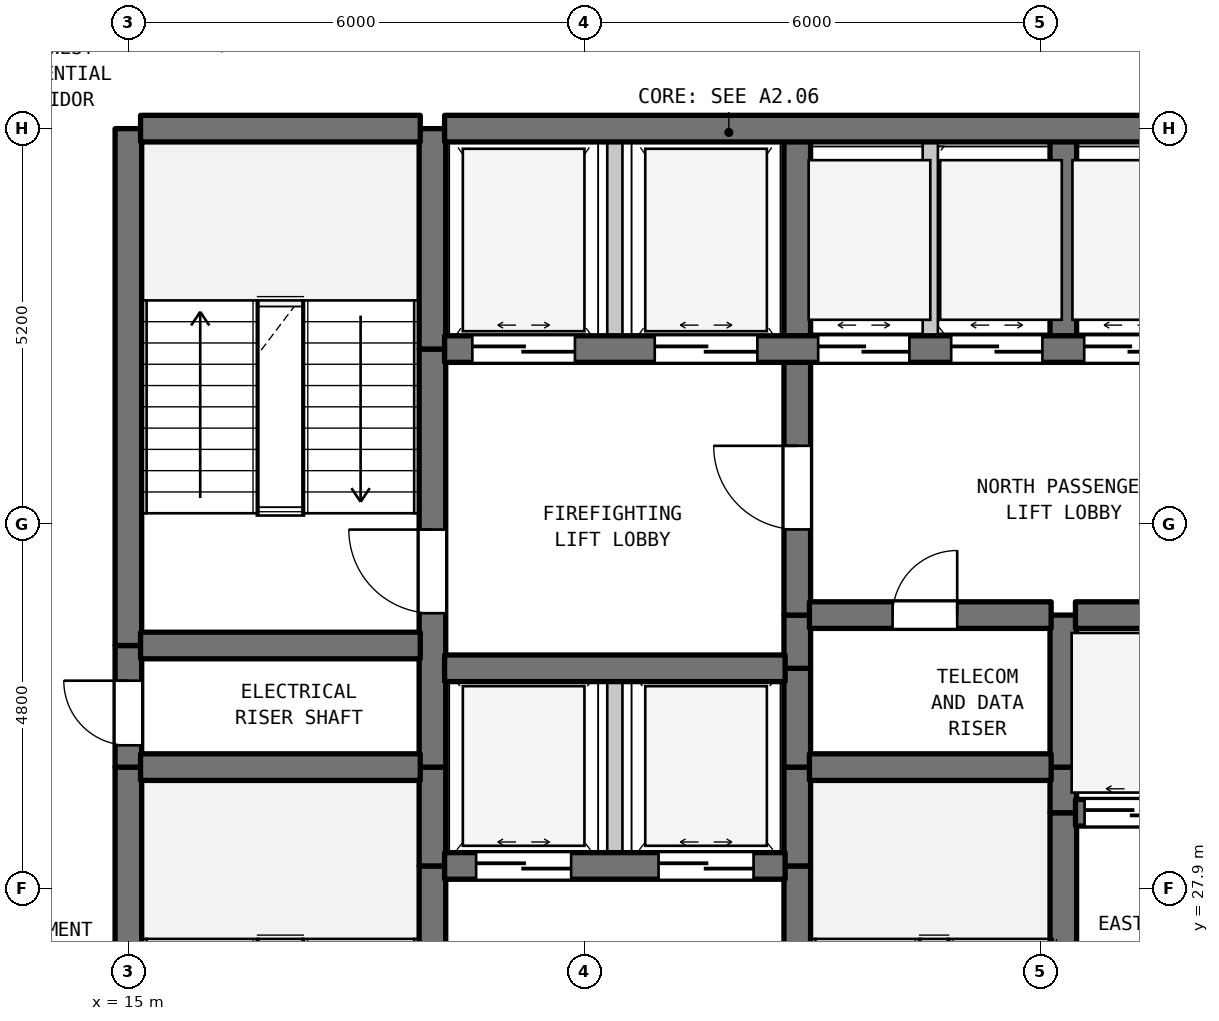
"""IFC4 building model, lengths in metres.
Left out: names, types, materials, properties, quantities, classifications, styles, units other than length and angle.
Written with IfcOpenShell. Run it as: python <this file> out.ifc"""

import sys

from ifc_helpers import new_model, si_unit, direction, frame, frame_2d, origin, place, context, subcontext, project, spatial, rectangle, extrude, element, fill, save


model = new_model("IFC4")
c1 = context("Model", 3, precision=1e-05, world=origin(), true_north=direction((0.0, 1.0)))
c2 = subcontext(c1, "Body", "Model", "MODEL_VIEW")
j1 = project(units=[si_unit("LENGTHUNIT", "METRE"), si_unit("PLANEANGLEUNIT", "RADIAN")], contexts=[c1])
p1 = place(None, origin())
s1 = spatial("IfcSite", under=j1, at=p1, CompositionType="ELEMENT")
p2 = place(p1, origin())
s2 = spatial("IfcBuilding", under=s1, at=p2, CompositionType="ELEMENT")
p3 = place(p2, frame((0.0, 0.0, 24.0)))
s3 = spatial("IfcBuildingStorey", under=s2, at=p3, CompositionType="ELEMENT", Elevation=24.0)
p4 = place(p3, frame((15.0, 22.7, 0.0), z_axis=(0.0, 0.0, 1.0), x_axis=(0.0, 1.0, 0.0)))
e1 = element("IfcWall", 1, at=p4, inside=s3, PredefinedType="SHEAR", context=c2, shape_type="SweptSolid", body=[
    extrude(rectangle(XDim=6.8, YDim=0.35, at=frame_2d((3.4, 0.0))), origin(), (0.0, 0.0, 1.0), 3.385),
])
p5 = place(p3, frame((15.0, 29.5, 0.0), z_axis=(0.0, 0.0, 1.0), x_axis=(0.0, 1.0, 0.0)))
e2 = element("IfcWall", 2, at=p5, inside=s3, PredefinedType="SHEAR", context=c2, shape_type="SweptSolid", body=[
    extrude(rectangle(XDim=1.6, YDim=0.35, at=frame_2d((0.8, 0.0))), origin(), (0.0, 0.0, 1.0), 3.385),
])
p6 = place(p5, frame((0.287, 0.0, 0.0)))
e3 = element("IfcOpeningElement", 3, at=p6, cuts=e2, PredefinedType="OPENING", context=c2, shape_type="SweptSolid", body=[
    extrude(rectangle(XDim=0.85, YDim=2.1, at=frame_2d((0.425, 1.05))), frame((0.0, 0.185, 0.0), z_axis=(0.0, -1.0, 0.0), x_axis=(1.0, 0.0, 0.0)), (0.0, 0.0, 1.0), 0.37),
])
p7 = place(p3, frame((15.0, 31.1, 0.0), z_axis=(0.0, 0.0, 1.0), x_axis=(0.0, 1.0, 0.0)))
e4 = element("IfcWall", 4, at=p7, inside=s3, PredefinedType="SHEAR", context=c2, shape_type="SweptSolid", body=[
    extrude(rectangle(XDim=6.8, YDim=0.35, at=frame_2d((3.4, 0.0))), origin(), (0.0, 0.0, 1.0), 3.385),
])
p8 = place(p3, frame((19.0, 22.7, 0.0), z_axis=(0.0, 0.0, 1.0), x_axis=(0.0, 1.0, 0.0)))
e5 = element("IfcWall", 5, at=p8, inside=s3, PredefinedType="SHEAR", context=c2, shape_type="SweptSolid", body=[
    extrude(rectangle(XDim=5.5, YDim=0.35, at=frame_2d((2.75, 0.0))), origin(), (0.0, 0.0, 1.0), 3.385),
])
p9 = place(p8, frame((0.631, 0.0, 0.0)))
e6 = element("IfcOpeningElement", 6, at=p9, cuts=e5, PredefinedType="OPENING", context=c2, shape_type="SweptSolid", body=[
    extrude(rectangle(XDim=1.1, YDim=2.15, at=frame_2d((0.55, 1.075))), frame((0.0, 0.185, 0.0), z_axis=(0.0, -1.0, 0.0), x_axis=(1.0, 0.0, 0.0)), (0.0, 0.0, 1.0), 0.37),
])
p10 = place(p3, frame((19.0, 28.2, 0.0), z_axis=(0.0, 0.0, 1.0), x_axis=(0.0, 1.0, 0.0)))
e7 = element("IfcWall", 7, at=p10, inside=s3, PredefinedType="SHEAR", context=c2, shape_type="SweptSolid", body=[
    extrude(rectangle(XDim=1.3, YDim=0.35, at=frame_2d((0.65, 0.0))), origin(), (0.0, 0.0, 1.0), 3.385),
])
p11 = place(p3, frame((19.0, 29.5, 0.0), z_axis=(0.0, 0.0, 1.0), x_axis=(0.0, 1.0, 0.0)))
e8 = element("IfcWall", 8, at=p11, inside=s3, PredefinedType="SHEAR", context=c2, shape_type="SweptSolid", body=[
    extrude(rectangle(XDim=5.5, YDim=0.35, at=frame_2d((2.75, 0.0))), origin(), (0.0, 0.0, 1.0), 3.385),
])
p12 = place(p11, frame((2.025, 0.0, 0.0)))
e9 = element("IfcOpeningElement", 9, at=p12, cuts=e8, PredefinedType="OPENING", context=c2, shape_type="SweptSolid", body=[
    extrude(rectangle(XDim=1.1, YDim=2.15, at=frame_2d((0.55, 1.075))), frame((0.0, 0.185, 0.0), z_axis=(0.0, -1.0, 0.0), x_axis=(1.0, 0.0, 0.0)), (0.0, 0.0, 1.0), 0.37),
])
p13 = place(p3, frame((19.0, 35.0, 0.0), z_axis=(0.0, 0.0, 1.0), x_axis=(0.0, 1.0, 0.0)))
e10 = element("IfcWall", 10, at=p13, inside=s3, PredefinedType="SHEAR", context=c2, shape_type="SweptSolid", body=[
    extrude(rectangle(XDim=2.9, YDim=0.35, at=frame_2d((1.45, 0.0))), origin(), (0.0, 0.0, 1.0), 3.385),
])
p14 = place(p3, frame((21.4, 28.2, 0.0), z_axis=(0.0, 0.0, 1.0), x_axis=(0.0, 1.0, 0.0)))
e11 = element("IfcWall", 11, at=p14, inside=s3, PredefinedType="STANDARD", context=c2, shape_type="SweptSolid", body=[
    extrude(rectangle(XDim=2.6, YDim=0.2, at=frame_2d((1.3, 0.0))), origin(), (0.0, 0.0, 1.0), 3.385),
])
p15 = place(p3, frame((21.4, 35.0, 0.0), z_axis=(0.0, 0.0, 1.0), x_axis=(0.0, 1.0, 0.0)))
e12 = element("IfcWall", 12, at=p15, inside=s3, PredefinedType="STANDARD", context=c2, shape_type="SweptSolid", body=[
    extrude(rectangle(XDim=2.9, YDim=0.2, at=frame_2d((1.45, 0.0))), origin(), (0.0, 0.0, 1.0), 3.385),
])
p16 = place(p3, frame((23.8, 22.7, 0.0), z_axis=(0.0, 0.0, 1.0), x_axis=(0.0, 1.0, 0.0)))
e13 = element("IfcWall", 13, at=p16, inside=s3, PredefinedType="SHEAR", context=c2, shape_type="SweptSolid", body=[
    extrude(rectangle(XDim=5.5, YDim=0.35, at=frame_2d((2.75, 0.0))), origin(), (0.0, 0.0, 1.0), 3.385),
])
p17 = place(p16, frame((0.235, 0.0, 0.0)))
e14 = element("IfcOpeningElement", 14, at=p17, cuts=e13, PredefinedType="OPENING", context=c2, shape_type="SweptSolid", body=[
    extrude(rectangle(XDim=1.1, YDim=2.15, at=frame_2d((0.55, 1.075))), frame((0.0, 0.185, 0.0), z_axis=(0.0, -1.0, 0.0), x_axis=(1.0, 0.0, 0.0)), (0.0, 0.0, 1.0), 0.37),
])
for number, where, z_axis, x_axis in (
    (15, (23.8, 28.2, 0.0), (0.0, 0.0, 1.0), (0.0, 1.0, 0.0)),
    (16, (23.8, 29.5, 0.0), (0.0, 0.0, 1.0), (0.0, 1.0, 0.0)),
):
    element("IfcWall", number, at=place(p3, frame(where, z_axis=z_axis, x_axis=x_axis)), inside=s3, PredefinedType="SHEAR", context=c2, shape_type="SweptSolid", body=[
        extrude(rectangle(XDim=1.3, YDim=0.35, at=frame_2d((0.65, 0.0))), origin(), (0.0, 0.0, 1.0), 3.385),
    ])
p18 = place(p3, frame((23.8, 30.8, 0.0), z_axis=(0.0, 0.0, 1.0), x_axis=(0.0, 1.0, 0.0)))
e17 = element("IfcWall", 17, at=p18, inside=s3, PredefinedType="SHEAR", context=c2, shape_type="SweptSolid", body=[
    extrude(rectangle(XDim=0.7, YDim=0.35, at=frame_2d((0.35, 0.0))), origin(), (0.0, 0.0, 1.0), 3.385),
])
p19 = place(p3, frame((23.8, 31.5, 0.0), z_axis=(0.0, 0.0, 1.0), x_axis=(0.0, 1.0, 0.0)))
e18 = element("IfcWall", 18, at=p19, inside=s3, PredefinedType="SHEAR", context=c2, shape_type="SweptSolid", body=[
    extrude(rectangle(XDim=3.5, YDim=0.35, at=frame_2d((1.75, 0.0))), origin(), (0.0, 0.0, 1.0), 3.385),
])
p20 = place(p19, frame((1.127, 0.0, 0.0)))
e19 = element("IfcOpeningElement", 19, at=p20, cuts=e18, PredefinedType="OPENING", context=c2, shape_type="SweptSolid", body=[
    extrude(rectangle(XDim=1.1, YDim=2.15, at=frame_2d((0.55, 1.075))), frame((0.0, 0.185, 0.0), z_axis=(0.0, -1.0, 0.0), x_axis=(1.0, 0.0, 0.0)), (0.0, 0.0, 1.0), 0.37),
])
p21 = place(p3, frame((23.8, 35.0, 0.0), z_axis=(0.0, 0.0, 1.0), x_axis=(0.0, 1.0, 0.0)))
e20 = element("IfcWall", 20, at=p21, inside=s3, PredefinedType="SHEAR", context=c2, shape_type="SweptSolid", body=[
    extrude(rectangle(XDim=2.9, YDim=0.35, at=frame_2d((1.45, 0.0))), origin(), (0.0, 0.0, 1.0), 3.385),
])
p22 = place(p3, frame((25.55, 35.0, 0.0), z_axis=(0.0, 0.0, 1.0), x_axis=(0.0, 1.0, 0.0)))
e21 = element("IfcWall", 21, at=p22, inside=s3, PredefinedType="STANDARD", context=c2, shape_type="SweptSolid", body=[
    extrude(rectangle(XDim=2.9, YDim=0.2, at=frame_2d((1.45, 0.0))), origin(), (0.0, 0.0, 1.0), 3.385),
])
p23 = place(p3, frame((27.3, 25.6, 0.0), z_axis=(0.0, 0.0, 1.0), x_axis=(0.0, 1.0, 0.0)))
e22 = element("IfcWall", 22, at=p23, inside=s3, PredefinedType="SHEAR", context=c2, shape_type="SweptSolid", body=[
    extrude(rectangle(XDim=3.3, YDim=0.35, at=frame_2d((1.65, 0.0))), origin(), (0.0, 0.0, 1.0), 3.385),
])
p24 = place(p3, frame((27.3, 28.9, 0.0), z_axis=(0.0, 0.0, 1.0), x_axis=(0.0, 1.0, 0.0)))
e23 = element("IfcWall", 23, at=p24, inside=s3, PredefinedType="SHEAR", context=c2, shape_type="SweptSolid", body=[
    extrude(rectangle(XDim=0.6, YDim=0.35, at=frame_2d((0.3, 0.0))), origin(), (0.0, 0.0, 1.0), 3.385),
])
p25 = place(p3, frame((27.3, 29.5, 0.0), z_axis=(0.0, 0.0, 1.0), x_axis=(0.0, 1.0, 0.0)))
e24 = element("IfcWall", 24, at=p25, inside=s3, PredefinedType="SHEAR", context=c2, shape_type="SweptSolid", body=[
    extrude(rectangle(XDim=2.0, YDim=0.35, at=frame_2d((1.0, 0.0))), origin(), (0.0, 0.0, 1.0), 3.385),
])
p26 = place(p3, frame((27.3, 35.0, 0.0), z_axis=(0.0, 0.0, 1.0), x_axis=(0.0, 1.0, 0.0)))
e25 = element("IfcWall", 25, at=p26, inside=s3, PredefinedType="SHEAR", context=c2, shape_type="SweptSolid", body=[
    extrude(rectangle(XDim=2.9, YDim=0.35, at=frame_2d((1.45, 0.0))), origin(), (0.0, 0.0, 1.0), 3.385),
])
p27 = place(p3, frame((19.16, 28.2, 0.0), z_axis=(0.0, 0.0, 1.0), x_axis=(1.0, 0.0, 0.0)))
e26 = element("IfcWall", 26, at=p27, inside=s3, PredefinedType="SHEAR", context=c2, shape_type="SweptSolid", body=[
    extrude(rectangle(XDim=4.48, YDim=0.35, at=frame_2d((2.24, 0.0))), origin(), (0.0, 0.0, 1.0), 3.385),
])
p28 = place(p27, frame((0.415, 0.0, 0.0)))
e27 = element("IfcOpeningElement", 27, at=p28, cuts=e26, PredefinedType="OPENING", context=c2, shape_type="SweptSolid", body=[
    extrude(rectangle(XDim=1.25, YDim=2.2, at=frame_2d((0.625, 1.1))), frame((0.0, 0.185, 0.0), z_axis=(0.0, -1.0, 0.0), x_axis=(1.0, 0.0, 0.0)), (0.0, 0.0, 1.0), 0.37),
])
p29 = place(p27, frame((2.815, 0.0, 0.0)))
e28 = element("IfcOpeningElement", 28, at=p29, cuts=e26, PredefinedType="OPENING", context=c2, shape_type="SweptSolid", body=[
    extrude(rectangle(XDim=1.25, YDim=2.2, at=frame_2d((0.625, 1.1))), frame((0.0, 0.185, 0.0), z_axis=(0.0, -1.0, 0.0), x_axis=(1.0, 0.0, 0.0)), (0.0, 0.0, 1.0), 0.37),
])
p30 = place(p3, frame((27.46, 28.9, 0.0), z_axis=(0.0, 0.0, 1.0), x_axis=(1.0, 0.0, 0.0)))
e29 = element("IfcWall", 29, at=p30, inside=s3, PredefinedType="SHEAR", context=c2, shape_type="SweptSolid", body=[
    extrude(rectangle(XDim=3.18, YDim=0.35, at=frame_2d((1.59, 0.0))), origin(), (0.0, 0.0, 1.0), 3.385),
])
p31 = place(p30, frame((0.12, 0.0, 0.0)))
e30 = element("IfcOpeningElement", 30, at=p31, cuts=e29, PredefinedType="OPENING", context=c2, shape_type="SweptSolid", body=[
    extrude(rectangle(XDim=1.25, YDim=2.2, at=frame_2d((0.625, 1.1))), frame((0.0, 0.185, 0.0), z_axis=(0.0, -1.0, 0.0), x_axis=(1.0, 0.0, 0.0)), (0.0, 0.0, 1.0), 0.37),
])
p32 = place(p30, frame((1.81, 0.0, 0.0)))
e31 = element("IfcOpeningElement", 31, at=p32, cuts=e29, PredefinedType="OPENING", context=c2, shape_type="SweptSolid", body=[
    extrude(rectangle(XDim=1.25, YDim=2.2, at=frame_2d((0.625, 1.1))), frame((0.0, 0.185, 0.0), z_axis=(0.0, -1.0, 0.0), x_axis=(1.0, 0.0, 0.0)), (0.0, 0.0, 1.0), 0.37),
])
p33 = place(p3, frame((15.16, 29.5, 0.0), z_axis=(0.0, 0.0, 1.0), x_axis=(1.0, 0.0, 0.0)))
e32 = element("IfcWall", 32, at=p33, inside=s3, PredefinedType="SHEAR", context=c2, shape_type="SweptSolid", body=[
    extrude(rectangle(XDim=3.68, YDim=0.35, at=frame_2d((1.84, 0.0))), origin(), (0.0, 0.0, 1.0), 3.385),
])
p34 = place(p3, frame((23.96, 29.5, 0.0), z_axis=(0.0, 0.0, 1.0), x_axis=(1.0, 0.0, 0.0)))
e33 = element("IfcWall", 33, at=p34, inside=s3, PredefinedType="SHEAR", context=c2, shape_type="SweptSolid", body=[
    extrude(rectangle(XDim=3.18, YDim=0.35, at=frame_2d((1.59, 0.0))), origin(), (0.0, 0.0, 1.0), 3.385),
])
p35 = place(p3, frame((19.16, 30.8, 0.0), z_axis=(0.0, 0.0, 1.0), x_axis=(1.0, 0.0, 0.0)))
e34 = element("IfcWall", 34, at=p35, inside=s3, PredefinedType="SHEAR", context=c2, shape_type="SweptSolid", body=[
    extrude(rectangle(XDim=4.48, YDim=0.35, at=frame_2d((2.24, 0.0))), origin(), (0.0, 0.0, 1.0), 3.385),
])
p36 = place(p3, frame((15.16, 31.1, 0.0), z_axis=(0.0, 0.0, 1.0), x_axis=(1.0, 0.0, 0.0)))
e35 = element("IfcWall", 35, at=p36, inside=s3, PredefinedType="SHEAR", context=c2, shape_type="SweptSolid", body=[
    extrude(rectangle(XDim=3.68, YDim=0.35, at=frame_2d((1.84, 0.0))), origin(), (0.0, 0.0, 1.0), 3.385),
])
p37 = place(p3, frame((23.96, 31.5, 0.0), z_axis=(0.0, 0.0, 1.0), x_axis=(1.0, 0.0, 0.0)))
e36 = element("IfcWall", 36, at=p37, inside=s3, PredefinedType="SHEAR", context=c2, shape_type="SweptSolid", body=[
    extrude(rectangle(XDim=3.18, YDim=0.35, at=frame_2d((1.59, 0.0))), origin(), (0.0, 0.0, 1.0), 3.385),
])
p38 = place(p37, frame((1.094, 0.0, 0.0)))
e37 = element("IfcOpeningElement", 37, at=p38, cuts=e36, PredefinedType="OPENING", context=c2, shape_type="SweptSolid", body=[
    extrude(rectangle(XDim=0.85, YDim=2.1, at=frame_2d((0.425, 1.05))), frame((0.0, 0.185, 0.0), z_axis=(0.0, -1.0, 0.0), x_axis=(1.0, 0.0, 0.0)), (0.0, 0.0, 1.0), 0.37),
])
p39 = place(p3, frame((27.46, 31.5, 0.0), z_axis=(0.0, 0.0, 1.0), x_axis=(1.0, 0.0, 0.0)))
e38 = element("IfcWall", 38, at=p39, inside=s3, PredefinedType="SHEAR", context=c2, shape_type="SweptSolid", body=[
    extrude(rectangle(XDim=3.18, YDim=0.35, at=frame_2d((1.59, 0.0))), origin(), (0.0, 0.0, 1.0), 3.385),
])
p40 = place(p3, frame((19.16, 35.0, 0.0), z_axis=(0.0, 0.0, 1.0), x_axis=(1.0, 0.0, 0.0)))
e39 = element("IfcWall", 39, at=p40, inside=s3, PredefinedType="SHEAR", context=c2, shape_type="SweptSolid", body=[
    extrude(rectangle(XDim=11.48, YDim=0.35, at=frame_2d((5.74, 0.0))), origin(), (0.0, 0.0, 1.0), 3.385),
])
p41 = place(p40, frame((0.365, 0.0, 0.0)))
e40 = element("IfcOpeningElement", 40, at=p41, cuts=e39, PredefinedType="OPENING", context=c2, shape_type="SweptSolid", body=[
    extrude(rectangle(XDim=1.35, YDim=2.2, at=frame_2d((0.675, 1.1))), frame((0.0, 0.185, 0.0), z_axis=(0.0, -1.0, 0.0), x_axis=(1.0, 0.0, 0.0)), (0.0, 0.0, 1.0), 0.37),
])
p42 = place(p40, frame((2.765, 0.0, 0.0)))
e41 = element("IfcOpeningElement", 41, at=p42, cuts=e39, PredefinedType="OPENING", context=c2, shape_type="SweptSolid", body=[
    extrude(rectangle(XDim=1.35, YDim=2.2, at=frame_2d((0.675, 1.1))), frame((0.0, 0.185, 0.0), z_axis=(0.0, -1.0, 0.0), x_axis=(1.0, 0.0, 0.0)), (0.0, 0.0, 1.0), 0.37),
])
p43 = place(p40, frame((4.915, 0.0, 0.0)))
e42 = element("IfcOpeningElement", 42, at=p43, cuts=e39, PredefinedType="OPENING", context=c2, shape_type="SweptSolid", body=[
    extrude(rectangle(XDim=1.2, YDim=2.2, at=frame_2d((0.6, 1.1))), frame((0.0, 0.185, 0.0), z_axis=(0.0, -1.0, 0.0), x_axis=(1.0, 0.0, 0.0)), (0.0, 0.0, 1.0), 0.37),
])
p44 = place(p40, frame((6.665, 0.0, 0.0)))
e43 = element("IfcOpeningElement", 43, at=p44, cuts=e39, PredefinedType="OPENING", context=c2, shape_type="SweptSolid", body=[
    extrude(rectangle(XDim=1.2, YDim=2.2, at=frame_2d((0.6, 1.1))), frame((0.0, 0.185, 0.0), z_axis=(0.0, -1.0, 0.0), x_axis=(1.0, 0.0, 0.0)), (0.0, 0.0, 1.0), 0.37),
])
p45 = place(p40, frame((8.415, 0.0, 0.0)))
e44 = element("IfcOpeningElement", 44, at=p45, cuts=e39, PredefinedType="OPENING", context=c2, shape_type="SweptSolid", body=[
    extrude(rectangle(XDim=1.2, YDim=2.2, at=frame_2d((0.6, 1.1))), frame((0.0, 0.185, 0.0), z_axis=(0.0, -1.0, 0.0), x_axis=(1.0, 0.0, 0.0)), (0.0, 0.0, 1.0), 0.37),
])
p46 = place(p40, frame((10.16, 0.0, 0.0)))
e45 = element("IfcOpeningElement", 45, at=p46, cuts=e39, PredefinedType="OPENING", context=c2, shape_type="SweptSolid", body=[
    extrude(rectangle(XDim=1.2, YDim=2.2, at=frame_2d((0.6, 1.1))), frame((0.0, 0.185, 0.0), z_axis=(0.0, -1.0, 0.0), x_axis=(1.0, 0.0, 0.0)), (0.0, 0.0, 1.0), 0.37),
])
p47 = place(p3, frame((15.16, 37.9, 0.0), z_axis=(0.0, 0.0, 1.0), x_axis=(1.0, 0.0, 0.0)))
e46 = element("IfcWall", 46, at=p47, inside=s3, PredefinedType="SHEAR", context=c2, shape_type="SweptSolid", body=[
    extrude(rectangle(XDim=3.68, YDim=0.35, at=frame_2d((1.84, 0.0))), origin(), (0.0, 0.0, 1.0), 3.385),
])
p48 = place(p3, frame((19.16, 37.9, 0.0), z_axis=(0.0, 0.0, 1.0), x_axis=(1.0, 0.0, 0.0)))
e47 = element("IfcWall", 47, at=p48, inside=s3, PredefinedType="SHEAR", context=c2, shape_type="SweptSolid", body=[
    extrude(rectangle(XDim=11.48, YDim=0.35, at=frame_2d((5.74, 0.0))), origin(), (0.0, 0.0, 1.0), 3.385),
])
p49 = place(p6, origin())
e48 = element("IfcDoor", 48, at=p49, inside=s3, OperationType="SINGLE_SWING_RIGHT", PredefinedType="DOOR", context=c2, shape_type="SweptSolid", body=[
    extrude(rectangle(XDim=0.85, YDim=2.1, at=frame_2d((0.425, 1.05))), frame((0.0, 0.025, 0.0), z_axis=(0.0, -1.0, 0.0), x_axis=(1.0, 0.0, 0.0)), (0.0, 0.0, 1.0), 0.05),
])
fill(e3, e48)
p50 = place(p12, origin())
e49 = element("IfcDoor", 49, at=p50, inside=s3, OperationType="SINGLE_SWING_RIGHT", PredefinedType="DOOR", context=c2, shape_type="SweptSolid", body=[
    extrude(rectangle(XDim=1.1, YDim=2.15, at=frame_2d((0.55, 1.075))), frame((0.0, 0.025, 0.0), z_axis=(0.0, -1.0, 0.0), x_axis=(1.0, 0.0, 0.0)), (0.0, 0.0, 1.0), 0.05),
])
fill(e9, e49)
p51 = place(p20, origin())
e50 = element("IfcDoor", 50, at=p51, inside=s3, OperationType="SINGLE_SWING_RIGHT", PredefinedType="DOOR", context=c2, shape_type="SweptSolid", body=[
    extrude(rectangle(XDim=1.1, YDim=2.15, at=frame_2d((0.55, 1.075))), frame((0.0, 0.025, 0.0), z_axis=(0.0, -1.0, 0.0), x_axis=(1.0, 0.0, 0.0)), (0.0, 0.0, 1.0), 0.05),
])
fill(e19, e50)
p52 = place(p28, origin())
e51 = element("IfcDoor", 51, at=p52, inside=s3, OperationType="DOUBLE_DOOR_SLIDING", PredefinedType="DOOR", context=c2, shape_type="SweptSolid", body=[
    extrude(rectangle(XDim=1.25, YDim=2.2, at=frame_2d((0.625, 1.1))), frame((0.0, 0.025, 0.0), z_axis=(0.0, -1.0, 0.0), x_axis=(1.0, 0.0, 0.0)), (0.0, 0.0, 1.0), 0.05),
])
fill(e27, e51)
p53 = place(p29, origin())
e52 = element("IfcDoor", 52, at=p53, inside=s3, OperationType="DOUBLE_DOOR_SLIDING", PredefinedType="DOOR", context=c2, shape_type="SweptSolid", body=[
    extrude(rectangle(XDim=1.25, YDim=2.2, at=frame_2d((0.625, 1.1))), frame((0.0, 0.025, 0.0), z_axis=(0.0, -1.0, 0.0), x_axis=(1.0, 0.0, 0.0)), (0.0, 0.0, 1.0), 0.05),
])
fill(e28, e52)
p54 = place(p31, origin())
e53 = element("IfcDoor", 53, at=p54, inside=s3, OperationType="DOUBLE_DOOR_SLIDING", PredefinedType="DOOR", context=c2, shape_type="SweptSolid", body=[
    extrude(rectangle(XDim=1.25, YDim=2.2, at=frame_2d((0.625, 1.1))), frame((0.0, 0.025, 0.0), z_axis=(0.0, -1.0, 0.0), x_axis=(1.0, 0.0, 0.0)), (0.0, 0.0, 1.0), 0.05),
])
fill(e30, e53)
p55 = place(p38, origin())
e54 = element("IfcDoor", 54, at=p55, inside=s3, OperationType="SINGLE_SWING_RIGHT", PredefinedType="DOOR", context=c2, shape_type="SweptSolid", body=[
    extrude(rectangle(XDim=0.85, YDim=2.1, at=frame_2d((0.425, 1.05))), frame((0.0, 0.025, 0.0), z_axis=(0.0, -1.0, 0.0), x_axis=(1.0, 0.0, 0.0)), (0.0, 0.0, 1.0), 0.05),
])
fill(e37, e54)
p56 = place(p41, origin())
e55 = element("IfcDoor", 55, at=p56, inside=s3, OperationType="DOUBLE_DOOR_SLIDING", PredefinedType="DOOR", context=c2, shape_type="SweptSolid", body=[
    extrude(rectangle(XDim=1.35, YDim=2.2, at=frame_2d((0.675, 1.1))), frame((0.0, 0.025, 0.0), z_axis=(0.0, -1.0, 0.0), x_axis=(1.0, 0.0, 0.0)), (0.0, 0.0, 1.0), 0.05),
])
fill(e40, e55)
p57 = place(p42, origin())
e56 = element("IfcDoor", 56, at=p57, inside=s3, OperationType="DOUBLE_DOOR_SLIDING", PredefinedType="DOOR", context=c2, shape_type="SweptSolid", body=[
    extrude(rectangle(XDim=1.35, YDim=2.2, at=frame_2d((0.675, 1.1))), frame((0.0, 0.025, 0.0), z_axis=(0.0, -1.0, 0.0), x_axis=(1.0, 0.0, 0.0)), (0.0, 0.0, 1.0), 0.05),
])
fill(e41, e56)
p58 = place(p43, origin())
e57 = element("IfcDoor", 57, at=p58, inside=s3, OperationType="DOUBLE_DOOR_SLIDING", PredefinedType="DOOR", context=c2, shape_type="SweptSolid", body=[
    extrude(rectangle(XDim=1.2, YDim=2.2, at=frame_2d((0.6, 1.1))), frame((0.0, 0.025, 0.0), z_axis=(0.0, -1.0, 0.0), x_axis=(1.0, 0.0, 0.0)), (0.0, 0.0, 1.0), 0.05),
])
fill(e42, e57)
p59 = place(p44, origin())
e58 = element("IfcDoor", 58, at=p59, inside=s3, OperationType="DOUBLE_DOOR_SLIDING", PredefinedType="DOOR", context=c2, shape_type="SweptSolid", body=[
    extrude(rectangle(XDim=1.2, YDim=2.2, at=frame_2d((0.6, 1.1))), frame((0.0, 0.025, 0.0), z_axis=(0.0, -1.0, 0.0), x_axis=(1.0, 0.0, 0.0)), (0.0, 0.0, 1.0), 0.05),
])
fill(e43, e58)
p60 = place(p45, origin())
e59 = element("IfcDoor", 59, at=p60, inside=s3, OperationType="DOUBLE_DOOR_SLIDING", PredefinedType="DOOR", context=c2, shape_type="SweptSolid", body=[
    extrude(rectangle(XDim=1.2, YDim=2.2, at=frame_2d((0.6, 1.1))), frame((0.0, 0.025, 0.0), z_axis=(0.0, -1.0, 0.0), x_axis=(1.0, 0.0, 0.0)), (0.0, 0.0, 1.0), 0.05),
])
fill(e44, e59)
save(model, sys.argv[1])
